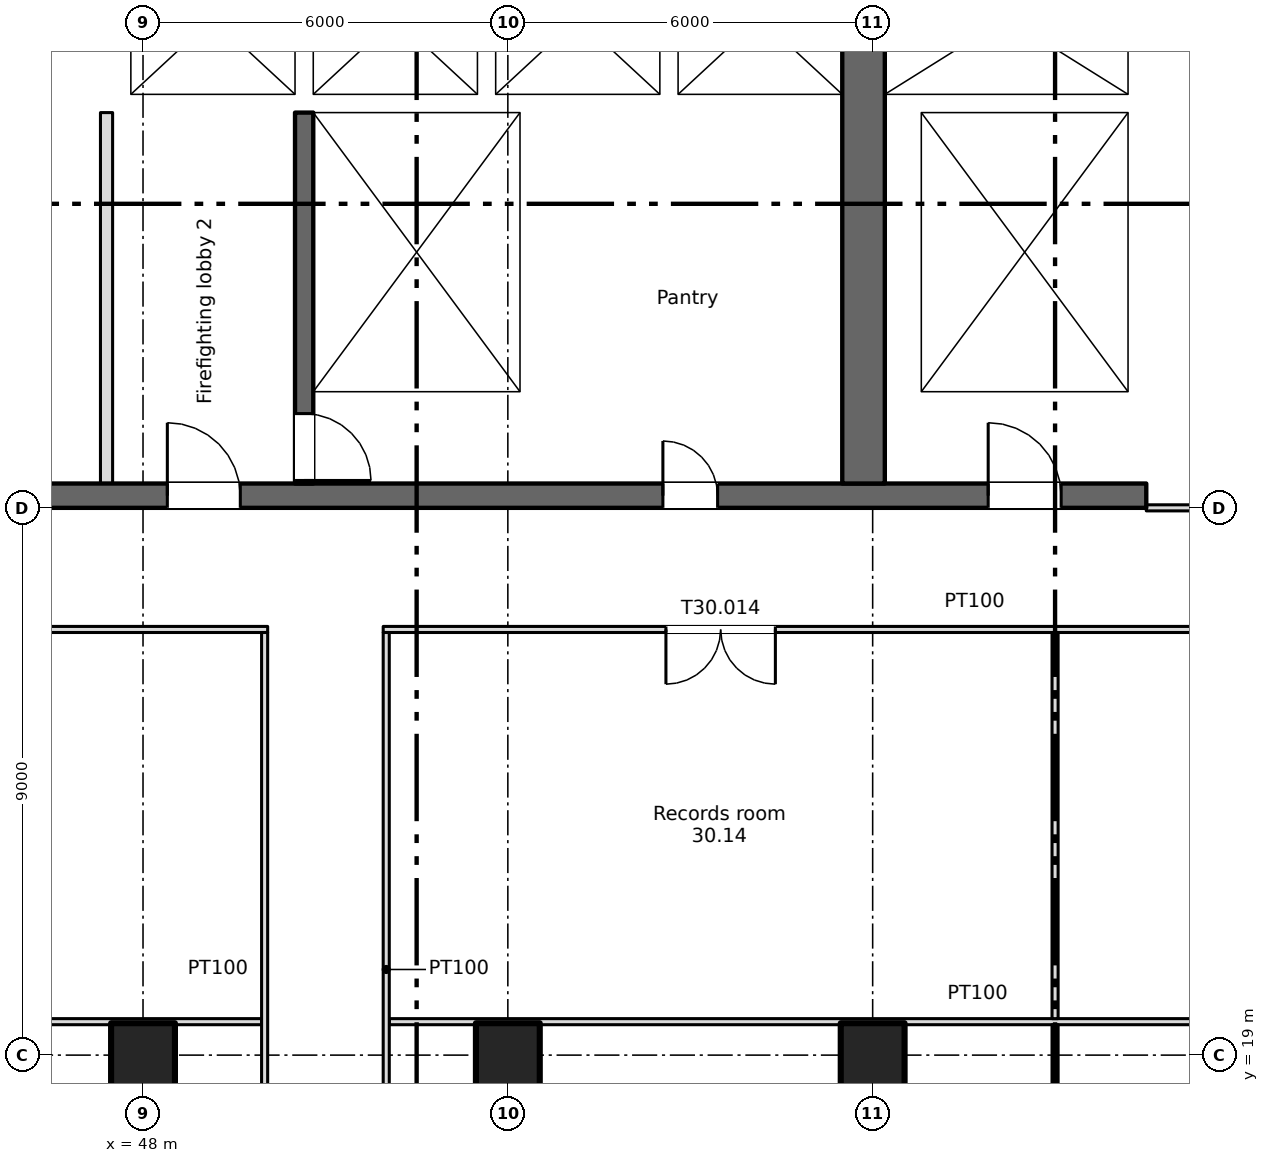
"""IFC4 building model, lengths in metres.
Left out: names, types, materials, properties, quantities, classifications, styles, units other than length and angle.
Written with IfcOpenShell. Run it as: python <this file> out.ifc"""

import sys

from ifc_helpers import new_model, si_unit, direction, frame, frame_2d, origin, origin_2d, place, context, subcontext, project, spatial, rectangle, extrude, element, fill, save


model = new_model("IFC4")
c1 = context("Model", 3, precision=1e-05, world=origin(), true_north=direction((0.0, 1.0)))
c2 = subcontext(c1, "Body", "Model", "MODEL_VIEW")
j1 = project(units=[si_unit("LENGTHUNIT", "METRE"), si_unit("PLANEANGLEUNIT", "RADIAN")], contexts=[c1])
p1 = place(None, origin())
s1 = spatial("IfcSite", under=j1, at=p1, CompositionType="ELEMENT")
p2 = place(p1, origin())
s2 = spatial("IfcBuilding", under=s1, at=p2, CompositionType="ELEMENT")
p3 = place(p2, frame((0.0, 0.0, 208.0)))
s3 = spatial("IfcBuildingStorey", under=s2, at=p3, CompositionType="ELEMENT", Elevation=208.0)
for number, where, z_axis, x_axis in (
    (1, (48.0, 19.0, 0.0), (0.0, 0.0, 1.0), (1.0, 0.0, 0.0)),
    (2, (54.0, 19.0, 0.0), (0.0, 0.0, 1.0), (1.0, 0.0, 0.0)),
    (3, (60.0, 19.0, 0.0), (0.0, 0.0, 1.0), (1.0, 0.0, 0.0)),
):
    element("IfcColumn", number, at=place(p3, frame(where, z_axis=z_axis, x_axis=x_axis)), inside=s3, PredefinedType="COLUMN", context=c2, shape_type="SweptSolid", body=[
        extrude(rectangle(XDim=1.05, YDim=1.05, at=origin_2d()), origin(), (0.0, 0.0, 1.0), 3.35),
    ])
p4 = place(p3, frame((6.6, 28.2, 0.0), z_axis=(0.0, 0.0, 1.0), x_axis=(1.0, 0.0, 0.0)))
e4 = element("IfcWall", 4, at=p4, inside=s3, PredefinedType="SHEAR", context=c2, shape_type="SweptSolid", body=[
    extrude(rectangle(XDim=57.9, YDim=0.4, at=frame_2d((28.95, 0.0))), origin(), (0.0, 0.0, 1.0), 3.35),
])
p5 = place(p4, frame((12.663, 0.0, 0.0)))
e5 = element("IfcOpeningElement", 5, at=p5, cuts=e4, PredefinedType="OPENING", context=c2, shape_type="SweptSolid", body=[
    extrude(rectangle(XDim=0.9, YDim=2.1, at=frame_2d((0.45, 1.05))), frame((0.0, 0.21, 0.0), z_axis=(0.0, -1.0, 0.0), x_axis=(1.0, 0.0, 0.0)), (0.0, 0.0, 1.0), 0.42),
])
p6 = place(p4, frame((15.238, 0.0, 0.0)))
e6 = element("IfcOpeningElement", 6, at=p6, cuts=e4, PredefinedType="OPENING", context=c2, shape_type="SweptSolid", body=[
    extrude(rectangle(XDim=0.9, YDim=2.1, at=frame_2d((0.45, 1.05))), frame((0.0, 0.21, 0.0), z_axis=(0.0, -1.0, 0.0), x_axis=(1.0, 0.0, 0.0)), (0.0, 0.0, 1.0), 0.42),
])
p7 = place(p4, frame((49.95, 0.0, 0.0)))
e7 = element("IfcOpeningElement", 7, at=p7, cuts=e4, PredefinedType="OPENING", context=c2, shape_type="SweptSolid", body=[
    extrude(rectangle(XDim=0.9, YDim=2.1, at=frame_2d((0.45, 1.05))), frame((0.0, 0.21, 0.0), z_axis=(0.0, -1.0, 0.0), x_axis=(1.0, 0.0, 0.0)), (0.0, 0.0, 1.0), 0.42),
])
p8 = place(p4, frame((0.663, 0.0, 0.0)))
e8 = element("IfcOpeningElement", 8, at=p8, cuts=e4, PredefinedType="OPENING", context=c2, shape_type="SweptSolid", body=[
    extrude(rectangle(XDim=0.9, YDim=2.1, at=frame_2d((0.45, 1.05))), frame((0.0, 0.21, 0.0), z_axis=(0.0, -1.0, 0.0), x_axis=(1.0, 0.0, 0.0)), (0.0, 0.0, 1.0), 0.42),
])
p9 = place(p4, frame((2.238, 0.0, 0.0)))
e9 = element("IfcOpeningElement", 9, at=p9, cuts=e4, PredefinedType="OPENING", context=c2, shape_type="SweptSolid", body=[
    extrude(rectangle(XDim=0.9, YDim=2.1, at=frame_2d((0.45, 1.05))), frame((0.0, 0.21, 0.0), z_axis=(0.0, -1.0, 0.0), x_axis=(1.0, 0.0, 0.0)), (0.0, 0.0, 1.0), 0.42),
])
p10 = place(p4, frame((4.8, 0.0, 0.0)))
e10 = element("IfcOpeningElement", 10, at=p10, cuts=e4, PredefinedType="OPENING", context=c2, shape_type="SweptSolid", body=[
    extrude(rectangle(XDim=1.2, YDim=2.1, at=frame_2d((0.6, 1.05))), frame((0.0, 0.21, 0.0), z_axis=(0.0, -1.0, 0.0), x_axis=(1.0, 0.0, 0.0)), (0.0, 0.0, 1.0), 0.42),
])
p11 = place(p4, frame((31.8, 0.0, 0.0)))
e11 = element("IfcOpeningElement", 11, at=p11, cuts=e4, PredefinedType="OPENING", context=c2, shape_type="SweptSolid", body=[
    extrude(rectangle(XDim=1.2, YDim=2.1, at=frame_2d((0.6, 1.05))), frame((0.0, 0.21, 0.0), z_axis=(0.0, -1.0, 0.0), x_axis=(1.0, 0.0, 0.0)), (0.0, 0.0, 1.0), 0.42),
])
p12 = place(p4, frame((55.3, 0.0, 0.0)))
e12 = element("IfcOpeningElement", 12, at=p12, cuts=e4, PredefinedType="OPENING", context=c2, shape_type="SweptSolid", body=[
    extrude(rectangle(XDim=1.2, YDim=2.1, at=frame_2d((0.6, 1.05))), frame((0.0, 0.21, 0.0), z_axis=(0.0, -1.0, 0.0), x_axis=(1.0, 0.0, 0.0)), (0.0, 0.0, 1.0), 0.42),
])
p13 = place(p4, frame((21.8, 0.0, 0.0)))
e13 = element("IfcOpeningElement", 13, at=p13, cuts=e4, PredefinedType="OPENING", context=c2, shape_type="SweptSolid", body=[
    extrude(rectangle(XDim=1.2, YDim=2.1, at=frame_2d((0.6, 1.05))), frame((0.0, 0.21, 0.0), z_axis=(0.0, -1.0, 0.0), x_axis=(1.0, 0.0, 0.0)), (0.0, 0.0, 1.0), 0.42),
])
p14 = place(p4, frame((41.8, 0.0, 0.0)))
e14 = element("IfcOpeningElement", 14, at=p14, cuts=e4, PredefinedType="OPENING", context=c2, shape_type="SweptSolid", body=[
    extrude(rectangle(XDim=1.2, YDim=2.1, at=frame_2d((0.6, 1.05))), frame((0.0, 0.21, 0.0), z_axis=(0.0, -1.0, 0.0), x_axis=(1.0, 0.0, 0.0)), (0.0, 0.0, 1.0), 0.42),
])
p15 = place(p4, frame((24.95, 0.0, 0.0)))
e15 = element("IfcOpeningElement", 15, at=p15, cuts=e4, PredefinedType="OPENING", context=c2, shape_type="SweptSolid", body=[
    extrude(rectangle(XDim=2.4, YDim=2.1, at=frame_2d((1.2, 1.05))), frame((0.0, 0.21, 0.0), z_axis=(0.0, -1.0, 0.0), x_axis=(1.0, 0.0, 0.0)), (0.0, 0.0, 1.0), 0.42),
])
p16 = place(p4, frame((37.45, 0.0, 0.0)))
e16 = element("IfcOpeningElement", 16, at=p16, cuts=e4, PredefinedType="OPENING", context=c2, shape_type="SweptSolid", body=[
    extrude(rectangle(XDim=2.4, YDim=2.1, at=frame_2d((1.2, 1.05))), frame((0.0, 0.21, 0.0), z_axis=(0.0, -1.0, 0.0), x_axis=(1.0, 0.0, 0.0)), (0.0, 0.0, 1.0), 0.42),
])
p17 = place(p4, frame((8.1, 0.0, 0.0)))
e17 = element("IfcOpeningElement", 17, at=p17, cuts=e4, PredefinedType="OPENING", context=c2, shape_type="SweptSolid", body=[
    extrude(rectangle(XDim=2.4, YDim=2.1, at=frame_2d((1.2, 1.05))), frame((0.0, 0.21, 0.0), z_axis=(0.0, -1.0, 0.0), x_axis=(1.0, 0.0, 0.0)), (0.0, 0.0, 1.0), 0.42),
])
p18 = place(p4, frame((28.95, 0.0, 0.0)))
e18 = element("IfcOpeningElement", 18, at=p18, cuts=e4, PredefinedType="OPENING", context=c2, shape_type="SweptSolid", body=[
    extrude(rectangle(XDim=0.9, YDim=2.1, at=frame_2d((0.45, 1.05))), frame((0.0, 0.21, 0.0), z_axis=(0.0, -1.0, 0.0), x_axis=(1.0, 0.0, 0.0)), (0.0, 0.0, 1.0), 0.42),
])
p19 = place(p4, frame((34.95, 0.0, 0.0)))
e19 = element("IfcOpeningElement", 19, at=p19, cuts=e4, PredefinedType="OPENING", context=c2, shape_type="SweptSolid", body=[
    extrude(rectangle(XDim=0.9, YDim=2.1, at=frame_2d((0.45, 1.05))), frame((0.0, 0.21, 0.0), z_axis=(0.0, -1.0, 0.0), x_axis=(1.0, 0.0, 0.0)), (0.0, 0.0, 1.0), 0.42),
])
p20 = place(p3, frame((64.35, 34.8, 0.0), z_axis=(0.0, 0.0, 1.0), x_axis=(0.0, 1.0, 0.0)))
e20 = element("IfcWall", 20, at=p20, inside=s3, PredefinedType="SHEAR", context=c2, shape_type="SweptSolid", body=[
    extrude(rectangle(XDim=10.5, YDim=0.3, at=frame_2d((5.25, 0.0))), origin(), (0.0, 0.0, 1.0), 3.35),
])
p21 = place(p3, frame((59.85, 28.4, 0.0), z_axis=(0.0, 0.0, 1.0), x_axis=(0.0, 1.0, 0.0)))
e21 = element("IfcWall", 21, at=p21, inside=s3, PredefinedType="SHEAR", context=c2, shape_type="SweptSolid", body=[
    extrude(rectangle(XDim=16.9, YDim=0.7, at=frame_2d((8.45, 0.0))), origin(), (0.0, 0.0, 1.0), 3.35),
])
p22 = place(p21, frame((9.6, 0.0, 0.0)))
e22 = element("IfcOpeningElement", 22, at=p22, cuts=e21, PredefinedType="OPENING", context=c2, shape_type="SweptSolid", body=[
    extrude(rectangle(XDim=2.0, YDim=2.1, at=frame_2d((1.0, 1.05))), frame((0.0, 0.36, 0.0), z_axis=(0.0, -1.0, 0.0), x_axis=(1.0, 0.0, 0.0)), (0.0, 0.0, 1.0), 0.72),
])
p23 = place(p21, frame((15.4, 0.0, 0.0)))
e23 = element("IfcOpeningElement", 23, at=p23, cuts=e21, PredefinedType="OPENING", context=c2, shape_type="SweptSolid", body=[
    extrude(rectangle(XDim=1.2, YDim=2.1, at=frame_2d((0.6, 1.05))), frame((0.0, 0.36, 0.0), z_axis=(0.0, -1.0, 0.0), x_axis=(1.0, 0.0, 0.0)), (0.0, 0.0, 1.0), 0.72),
])
p24 = place(p3, frame((50.65, 34.5, 0.0), z_axis=(0.0, 0.0, 1.0), x_axis=(0.0, -1.0, 0.0)))
e24 = element("IfcWall", 24, at=p24, inside=s3, PredefinedType="SHEAR", context=c2, shape_type="SweptSolid", body=[
    extrude(rectangle(XDim=6.1, YDim=0.3, at=frame_2d((3.05, 0.0))), origin(), (0.0, 0.0, 1.0), 3.35),
])
p25 = place(p24, frame((4.95, 0.0, 0.0)))
e25 = element("IfcOpeningElement", 25, at=p25, cuts=e24, PredefinedType="OPENING", context=c2, shape_type="SweptSolid", body=[
    extrude(rectangle(XDim=1.1, YDim=2.1, at=frame_2d((0.55, 1.05))), frame((0.0, 0.16, 0.0), z_axis=(0.0, -1.0, 0.0), x_axis=(1.0, 0.0, 0.0)), (0.0, 0.0, 1.0), 0.32),
])
p26 = place(p3, frame((54.35, 28.4, 0.0), z_axis=(0.0, 0.0, 1.0), x_axis=(0.0, 1.0, 0.0)))
e26 = element("IfcWall", 26, at=p26, inside=s3, PredefinedType="SHEAR", context=c2, shape_type="SweptSolid", body=[
    extrude(rectangle(XDim=6.1, YDim=0.3, at=frame_2d((3.05, 0.0))), origin(), (0.0, 0.0, 1.0), 3.35),
])
p27 = place(p3, frame((60.5, 28.4, 0.0), z_axis=(0.0, 0.0, 1.0), x_axis=(0.0, 1.0, 0.0)))
e27 = element("IfcWall", 27, at=p27, inside=s3, PredefinedType="SHEAR", context=c2, shape_type="SweptSolid", body=[
    extrude(rectangle(XDim=6.1, YDim=0.6, at=frame_2d((3.05, 0.0))), origin(), (0.0, 0.0, 1.0), 3.35),
])
p28 = place(p3, frame((64.35, 28.4, 0.0), z_axis=(0.0, 0.0, 1.0), x_axis=(0.0, 1.0, 0.0)))
e28 = element("IfcWall", 28, at=p28, inside=s3, PredefinedType="SHEAR", context=c2, shape_type="SweptSolid", body=[
    extrude(rectangle(XDim=6.1, YDim=0.3, at=frame_2d((3.05, 0.0))), origin(), (0.0, 0.0, 1.0), 3.35),
])
p29 = place(p3, frame((47.3, 34.65, 0.0), z_axis=(0.0, 0.0, 1.0), x_axis=(1.0, 0.0, 0.0)))
e29 = element("IfcWall", 29, at=p29, inside=s3, PredefinedType="SHEAR", context=c2, shape_type="SweptSolid", body=[
    extrude(rectangle(XDim=12.2, YDim=0.3, at=frame_2d((6.1, 0.0))), origin(), (0.0, 0.0, 1.0), 3.35),
])
p30 = place(p29, frame((1.3, 0.0, 0.0)))
e30 = element("IfcOpeningElement", 30, at=p30, cuts=e29, PredefinedType="OPENING", context=c2, shape_type="SweptSolid", body=[
    extrude(rectangle(XDim=1.1, YDim=2.1, at=frame_2d((0.55, 1.05))), frame((0.0, 0.16, 0.0), z_axis=(0.0, -1.0, 0.0), x_axis=(1.0, 0.0, 0.0)), (0.0, 0.0, 1.0), 0.32),
])
p31 = place(p3, frame((60.2, 34.65, 0.0), z_axis=(0.0, 0.0, 1.0), x_axis=(1.0, 0.0, 0.0)))
e31 = element("IfcWall", 31, at=p31, inside=s3, PredefinedType="SHEAR", context=c2, shape_type="SweptSolid", body=[
    extrude(rectangle(XDim=4.3, YDim=0.3, at=frame_2d((2.15, 0.0))), origin(), (0.0, 0.0, 1.0), 3.35),
])
p32 = place(p3, frame((47.55, 34.8, 0.0), z_axis=(0.0, 0.0, 1.0), x_axis=(0.0, 1.0, 0.0)))
e32 = element("IfcWall", 32, at=p32, inside=s3, PredefinedType="SHEAR", context=c2, shape_type="SweptSolid", body=[
    extrude(rectangle(XDim=2.5, YDim=0.5, at=frame_2d((1.25, 0.0))), origin(), (0.0, 0.0, 1.0), 3.35),
])
for number, where, z_axis, x_axis in (
    (33, (50.65, 34.8, 0.0), (0.0, 0.0, 1.0), (0.0, 1.0, 0.0)),
    (34, (53.65, 34.8, 0.0), (0.0, 0.0, 1.0), (0.0, 1.0, 0.0)),
    (35, (56.65, 34.8, 0.0), (0.0, 0.0, 1.0), (0.0, 1.0, 0.0)),
):
    element("IfcWall", number, at=place(p3, frame(where, z_axis=z_axis, x_axis=x_axis)), inside=s3, PredefinedType="SHEAR", context=c2, shape_type="SweptSolid", body=[
        extrude(rectangle(XDim=2.5, YDim=0.3, at=frame_2d((1.25, 0.0))), origin(), (0.0, 0.0, 1.0), 3.35),
    ])
p33 = place(p3, frame((47.4, 28.4, 0.0), z_axis=(0.0, 0.0, 1.0), x_axis=(0.0, 1.0, 0.0)))
e36 = element("IfcWall", 36, at=p33, inside=s3, PredefinedType="PARTITIONING", context=c2, shape_type="SweptSolid", body=[
    extrude(rectangle(XDim=6.1, YDim=0.2, at=frame_2d((3.05, 0.0))), origin(), (0.0, 0.0, 1.0), 3.35),
])
p34 = place(p3, frame((28.05, 19.55, 0.0), z_axis=(0.0, 0.0, 1.0), x_axis=(1.0, 0.0, 0.0)))
e37 = element("IfcWall", 37, at=p34, inside=s3, PredefinedType="PARTITIONING", context=c2, shape_type="SweptSolid", body=[
    extrude(rectangle(XDim=21.9, YDim=0.1, at=frame_2d((10.95, 0.0))), origin(), (0.0, 0.0, 1.0), 3.35),
])
p35 = place(p3, frame((52.05, 19.55, 0.0), z_axis=(0.0, 0.0, 1.0), x_axis=(1.0, 0.0, 0.0)))
e38 = element("IfcWall", 38, at=p35, inside=s3, PredefinedType="PARTITIONING", context=c2, shape_type="SweptSolid", body=[
    extrude(rectangle(XDim=19.35, YDim=0.1, at=frame_2d((9.675, 0.0))), origin(), (0.0, 0.0, 1.0), 3.35),
])
p36 = place(p3, frame((27.95, 26.0, 0.0), z_axis=(0.0, 0.0, 1.0), x_axis=(1.0, 0.0, 0.0)))
e39 = element("IfcWall", 39, at=p36, inside=s3, PredefinedType="PARTITIONING", context=c2, shape_type="SweptSolid", body=[
    extrude(rectangle(XDim=22.1, YDim=0.1, at=frame_2d((11.05, 0.0))), origin(), (0.0, 0.0, 1.0), 3.35),
])
p37 = place(p36, frame((10.15, 0.0, 0.0)))
e40 = element("IfcOpeningElement", 40, at=p37, cuts=e39, PredefinedType="OPENING", context=c2, shape_type="SweptSolid", body=[
    extrude(rectangle(XDim=1.8, YDim=2.1, at=frame_2d((0.9, 1.05))), frame((0.0, 0.06, 0.0), z_axis=(0.0, -1.0, 0.0), x_axis=(1.0, 0.0, 0.0)), (0.0, 0.0, 1.0), 0.12),
])
p38 = place(p3, frame((51.95, 26.0, 0.0), z_axis=(0.0, 0.0, 1.0), x_axis=(1.0, 0.0, 0.0)))
e41 = element("IfcWall", 41, at=p38, inside=s3, PredefinedType="PARTITIONING", context=c2, shape_type="SweptSolid", body=[
    extrude(rectangle(XDim=19.45, YDim=0.1, at=frame_2d((9.725, 0.0))), origin(), (0.0, 0.0, 1.0), 3.35),
])
p39 = place(p38, frame((4.65, 0.0, 0.0)))
e42 = element("IfcOpeningElement", 42, at=p39, cuts=e41, PredefinedType="OPENING", context=c2, shape_type="SweptSolid", body=[
    extrude(rectangle(XDim=1.8, YDim=2.1, at=frame_2d((0.9, 1.05))), frame((0.0, 0.06, 0.0), z_axis=(0.0, -1.0, 0.0), x_axis=(1.0, 0.0, 0.0)), (0.0, 0.0, 1.0), 0.12),
])
p40 = place(p38, frame((14.75, 0.0, 0.0)))
e43 = element("IfcOpeningElement", 43, at=p40, cuts=e41, PredefinedType="OPENING", context=c2, shape_type="SweptSolid", body=[
    extrude(rectangle(XDim=1.0, YDim=2.1, at=frame_2d((0.5, 1.05))), frame((0.0, 0.06, 0.0), z_axis=(0.0, -1.0, 0.0), x_axis=(1.0, 0.0, 0.0)), (0.0, 0.0, 1.0), 0.12),
])
p41 = place(p3, frame((64.5, 28.0, 0.0), z_axis=(0.0, 0.0, 1.0), x_axis=(1.0, 0.0, 0.0)))
e44 = element("IfcWall", 44, at=p41, inside=s3, PredefinedType="PARTITIONING", context=c2, shape_type="SweptSolid", body=[
    extrude(rectangle(XDim=6.9, YDim=0.1, at=frame_2d((3.45, 0.0))), origin(), (0.0, 0.0, 1.0), 3.35),
])
p42 = place(p41, frame((2.55, 0.0, 0.0)))
e45 = element("IfcOpeningElement", 45, at=p42, cuts=e44, PredefinedType="OPENING", context=c2, shape_type="SweptSolid", body=[
    extrude(rectangle(XDim=1.8, YDim=2.1, at=frame_2d((0.9, 1.05))), frame((0.0, 0.06, 0.0), z_axis=(0.0, -1.0, 0.0), x_axis=(1.0, 0.0, 0.0)), (0.0, 0.0, 1.0), 0.12),
])
for number, where, z_axis, x_axis in (
    (46, (50.0, 12.65, 0.0), (0.0, 0.0, 1.0), (0.0, 1.0, 0.0)),
    (47, (52.0, 12.65, 0.0), (0.0, 0.0, 1.0), (0.0, 1.0, 0.0)),
):
    element("IfcWall", number, at=place(p3, frame(where, z_axis=z_axis, x_axis=x_axis)), inside=s3, PredefinedType="PARTITIONING", context=c2, shape_type="SweptSolid", body=[
        extrude(rectangle(XDim=13.3, YDim=0.1, at=frame_2d((6.65, 0.0))), origin(), (0.0, 0.0, 1.0), 3.35),
    ])
p43 = place(p3, frame((63.0, 12.65, 0.0), z_axis=(0.0, 0.0, 1.0), x_axis=(0.0, 1.0, 0.0)))
e48 = element("IfcWall", 48, at=p43, inside=s3, PredefinedType="PARTITIONING", context=c2, shape_type="SweptSolid", body=[
    extrude(rectangle(XDim=6.85, YDim=0.1, at=frame_2d((3.425, 0.0))), origin(), (0.0, 0.0, 1.0), 3.35),
])
p44 = place(p3, frame((63.0, 19.6, 0.0), z_axis=(0.0, 0.0, 1.0), x_axis=(0.0, 1.0, 0.0)))
e49 = element("IfcWall", 49, at=p44, inside=s3, PredefinedType="PARTITIONING", context=c2, shape_type="SweptSolid", body=[
    extrude(rectangle(XDim=6.35, YDim=0.1, at=frame_2d((3.175, 0.0))), origin(), (0.0, 0.0, 1.0), 3.35),
])
p45 = place(p7, origin())
e50 = element("IfcDoor", 50, at=p45, inside=s3, OperationType="SINGLE_SWING_LEFT", PredefinedType="DOOR", context=c2, shape_type="SweptSolid", body=[
    extrude(rectangle(XDim=0.9, YDim=2.1, at=frame_2d((0.45, 1.05))), frame((0.0, 0.025, 0.0), z_axis=(0.0, -1.0, 0.0), x_axis=(1.0, 0.0, 0.0)), (0.0, 0.0, 1.0), 0.05),
])
fill(e7, e50)
p46 = place(p30, origin())
e51 = element("IfcDoor", 51, at=p46, inside=s3, OperationType="SLIDING_TO_LEFT", PredefinedType="DOOR", context=c2, shape_type="SweptSolid", body=[
    extrude(rectangle(XDim=1.1, YDim=2.1, at=frame_2d((0.55, 1.05))), frame((0.0, 0.025, 0.0), z_axis=(0.0, -1.0, 0.0), x_axis=(1.0, 0.0, 0.0)), (0.0, 0.0, 1.0), 0.05),
])
fill(e30, e51)
p47 = place(p25, origin())
e52 = element("IfcDoor", 52, at=p47, inside=s3, OperationType="SINGLE_SWING_RIGHT", PredefinedType="DOOR", context=c2, shape_type="SweptSolid", body=[
    extrude(rectangle(XDim=1.1, YDim=2.1, at=frame_2d((0.55, 1.05))), frame((0.0, 0.025, 0.0), z_axis=(0.0, -1.0, 0.0), x_axis=(1.0, 0.0, 0.0)), (0.0, 0.0, 1.0), 0.05),
])
fill(e25, e52)
p48 = place(p12, origin())
e53 = element("IfcDoor", 53, at=p48, inside=s3, OperationType="SINGLE_SWING_LEFT", PredefinedType="DOOR", context=c2, shape_type="SweptSolid", body=[
    extrude(rectangle(XDim=1.2, YDim=2.1, at=frame_2d((0.6, 1.05))), frame((0.0, 0.025, 0.0), z_axis=(0.0, -1.0, 0.0), x_axis=(1.0, 0.0, 0.0)), (0.0, 0.0, 1.0), 0.05),
])
fill(e12, e53)
p49 = place(p14, origin())
e54 = element("IfcDoor", 54, at=p49, inside=s3, OperationType="SINGLE_SWING_LEFT", PredefinedType="DOOR", context=c2, shape_type="SweptSolid", body=[
    extrude(rectangle(XDim=1.2, YDim=2.1, at=frame_2d((0.6, 1.05))), frame((0.0, 0.025, 0.0), z_axis=(0.0, -1.0, 0.0), x_axis=(1.0, 0.0, 0.0)), (0.0, 0.0, 1.0), 0.05),
])
fill(e14, e54)
p50 = place(p39, origin())
e55 = element("IfcDoor", 55, at=p50, inside=s3, OperationType="DOUBLE_DOOR_SINGLE_SWING", PredefinedType="DOOR", context=c2, shape_type="SweptSolid", body=[
    extrude(rectangle(XDim=1.8, YDim=2.1, at=frame_2d((0.9, 1.05))), frame((0.0, 0.025, 0.0), z_axis=(0.0, -1.0, 0.0), x_axis=(1.0, 0.0, 0.0)), (0.0, 0.0, 1.0), 0.05),
])
fill(e42, e55)
save(model, sys.argv[1])
